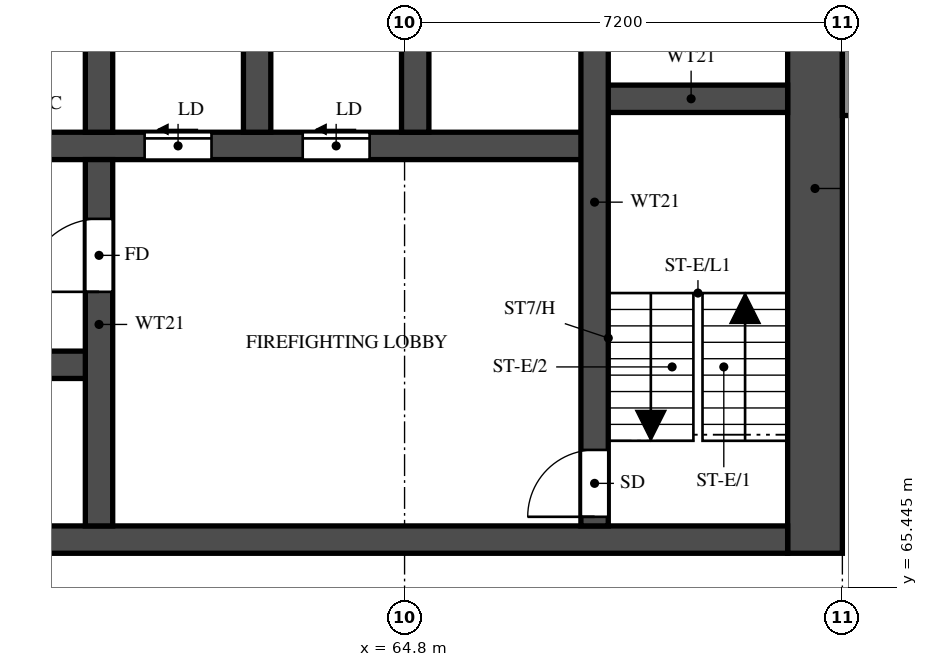
"""IFC4 building model, lengths in metres.
Left out: names, types, materials, properties, quantities, classifications, styles, units other than length and angle.
Written with IfcOpenShell. Run it as: python <this file> out.ifc"""

import sys

from ifc_helpers import new_model, si_unit, direction, frame, frame_2d, origin, place, context, subcontext, project, spatial, rectangle, extrude, element, fill, save


model = new_model("IFC4")
c1 = context("Model", 3, precision=1e-05, world=origin(), true_north=direction((0.0, 1.0)))
c2 = subcontext(c1, "Body", "Model", "MODEL_VIEW")
j1 = project(units=[si_unit("LENGTHUNIT", "METRE"), si_unit("PLANEANGLEUNIT", "RADIAN")], contexts=[c1])
p1 = place(None, origin())
s1 = spatial("IfcSite", under=j1, at=p1, CompositionType="ELEMENT")
p2 = place(p1, origin())
s2 = spatial("IfcBuilding", under=s1, at=p2, CompositionType="ELEMENT")
p3 = place(p2, frame((0.0, 0.0, 44.5)))
s3 = spatial("IfcBuildingStorey", under=s2, at=p3, CompositionType="ELEMENT", Elevation=44.5)
p4 = place(p3, frame((71.55, 66.0, 0.0), z_axis=(0.0, 0.0, 1.0), x_axis=(0.0, 1.0, 0.0)))
e1 = element("IfcWall", 1, at=p4, inside=s3, PredefinedType="SHEAR", context=c2, shape_type="SweptSolid", body=[
    extrude(rectangle(XDim=12.0, YDim=0.9, at=frame_2d((6.0, 0.0))), origin(), (0.0, 0.0, 1.0), 3.18),
])
p5 = place(p3, frame((29.7, 66.225, 0.0), z_axis=(0.0, 0.0, 1.0), x_axis=(1.0, 0.0, 0.0)))
e2 = element("IfcWall", 2, at=p5, inside=s3, PredefinedType="SHEAR", context=c2, shape_type="SweptSolid", body=[
    extrude(rectangle(XDim=41.4, YDim=0.45, at=frame_2d((20.7, 0.0))), origin(), (0.0, 0.0, 1.0), 3.18),
])
p6 = place(p5, frame((0.925, 0.0, 0.0)))
e3 = element("IfcOpeningElement", 3, at=p6, cuts=e2, PredefinedType="OPENING", context=c2, shape_type="SweptSolid", body=[
    extrude(rectangle(XDim=1.1, YDim=2.1, at=frame_2d((0.55, 1.05))), frame((0.0, 0.235, 0.0), z_axis=(0.0, -1.0, 0.0), x_axis=(1.0, 0.0, 0.0)), (0.0, 0.0, 1.0), 0.47),
])
p7 = place(p5, frame((3.738, 0.0, 0.0)))
e4 = element("IfcOpeningElement", 4, at=p7, cuts=e2, PredefinedType="OPENING", context=c2, shape_type="SweptSolid", body=[
    extrude(rectangle(XDim=1.8, YDim=2.1, at=frame_2d((0.9, 1.05))), frame((0.0, 0.235, 0.0), z_axis=(0.0, -1.0, 0.0), x_axis=(1.0, 0.0, 0.0)), (0.0, 0.0, 1.0), 0.47),
])
p8 = place(p3, frame((35.575, 69.1, 0.0), z_axis=(0.0, 0.0, 1.0), x_axis=(1.0, 0.0, 0.0)))
e5 = element("IfcWall", 5, at=p8, inside=s3, PredefinedType="SHEAR", context=c2, shape_type="SweptSolid", body=[
    extrude(rectangle(XDim=24.2, YDim=0.45, at=frame_2d((12.1, 0.0))), origin(), (0.0, 0.0, 1.0), 3.18),
])
p9 = place(p8, frame((1.05, 0.0, 0.0)))
e6 = element("IfcOpeningElement", 6, at=p9, cuts=e5, PredefinedType="OPENING", context=c2, shape_type="SweptSolid", body=[
    extrude(rectangle(XDim=1.1, YDim=2.1, at=frame_2d((0.55, 1.05))), frame((0.0, 0.235, 0.0), z_axis=(0.0, -1.0, 0.0), x_axis=(1.0, 0.0, 0.0)), (0.0, 0.0, 1.0), 0.47),
])
p10 = place(p8, frame((3.8, 0.0, 0.0)))
e7 = element("IfcOpeningElement", 7, at=p10, cuts=e5, PredefinedType="OPENING", context=c2, shape_type="SweptSolid", body=[
    extrude(rectangle(XDim=1.1, YDim=2.1, at=frame_2d((0.55, 1.05))), frame((0.0, 0.235, 0.0), z_axis=(0.0, -1.0, 0.0), x_axis=(1.0, 0.0, 0.0)), (0.0, 0.0, 1.0), 0.47),
])
p11 = place(p8, frame((6.55, 0.0, 0.0)))
e8 = element("IfcOpeningElement", 8, at=p11, cuts=e5, PredefinedType="OPENING", context=c2, shape_type="SweptSolid", body=[
    extrude(rectangle(XDim=1.1, YDim=2.1, at=frame_2d((0.55, 1.05))), frame((0.0, 0.235, 0.0), z_axis=(0.0, -1.0, 0.0), x_axis=(1.0, 0.0, 0.0)), (0.0, 0.0, 1.0), 0.47),
])
p12 = place(p8, frame((9.3, 0.0, 0.0)))
e9 = element("IfcOpeningElement", 9, at=p12, cuts=e5, PredefinedType="OPENING", context=c2, shape_type="SweptSolid", body=[
    extrude(rectangle(XDim=1.1, YDim=2.1, at=frame_2d((0.55, 1.05))), frame((0.0, 0.235, 0.0), z_axis=(0.0, -1.0, 0.0), x_axis=(1.0, 0.0, 0.0)), (0.0, 0.0, 1.0), 0.47),
])
p13 = place(p8, frame((12.05, 0.0, 0.0)))
e10 = element("IfcOpeningElement", 10, at=p13, cuts=e5, PredefinedType="OPENING", context=c2, shape_type="SweptSolid", body=[
    extrude(rectangle(XDim=1.1, YDim=2.1, at=frame_2d((0.55, 1.05))), frame((0.0, 0.235, 0.0), z_axis=(0.0, -1.0, 0.0), x_axis=(1.0, 0.0, 0.0)), (0.0, 0.0, 1.0), 0.47),
])
p14 = place(p8, frame((14.8, 0.0, 0.0)))
e11 = element("IfcOpeningElement", 11, at=p14, cuts=e5, PredefinedType="OPENING", context=c2, shape_type="SweptSolid", body=[
    extrude(rectangle(XDim=1.1, YDim=2.1, at=frame_2d((0.55, 1.05))), frame((0.0, 0.235, 0.0), z_axis=(0.0, -1.0, 0.0), x_axis=(1.0, 0.0, 0.0)), (0.0, 0.0, 1.0), 0.47),
])
p15 = place(p3, frame((32.875, 72.7, 0.0), z_axis=(0.0, 0.0, 1.0), x_axis=(1.0, 0.0, 0.0)))
e12 = element("IfcWall", 12, at=p15, inside=s3, PredefinedType="SHEAR", context=c2, shape_type="SweptSolid", body=[
    extrude(rectangle(XDim=35.05, YDim=0.45, at=frame_2d((17.525, 0.0))), origin(), (0.0, 0.0, 1.0), 3.18),
])
p16 = place(p15, frame((19.8, 0.0, 0.0)))
e13 = element("IfcOpeningElement", 13, at=p16, cuts=e12, PredefinedType="OPENING", context=c2, shape_type="SweptSolid", body=[
    extrude(rectangle(XDim=1.1, YDim=2.1, at=frame_2d((0.55, 1.05))), frame((0.0, 0.235, 0.0), z_axis=(0.0, -1.0, 0.0), x_axis=(1.0, 0.0, 0.0)), (0.0, 0.0, 1.0), 0.47),
])
p17 = place(p15, frame((27.65, 0.0, 0.0)))
e14 = element("IfcOpeningElement", 14, at=p17, cuts=e12, PredefinedType="OPENING", context=c2, shape_type="SweptSolid", body=[
    extrude(rectangle(XDim=1.1, YDim=2.1, at=frame_2d((0.55, 1.05))), frame((0.0, 0.235, 0.0), z_axis=(0.0, -1.0, 0.0), x_axis=(1.0, 0.0, 0.0)), (0.0, 0.0, 1.0), 0.47),
])
p18 = place(p15, frame((30.25, 0.0, 0.0)))
e15 = element("IfcOpeningElement", 15, at=p18, cuts=e12, PredefinedType="OPENING", context=c2, shape_type="SweptSolid", body=[
    extrude(rectangle(XDim=1.1, YDim=2.1, at=frame_2d((0.55, 1.05))), frame((0.0, 0.235, 0.0), z_axis=(0.0, -1.0, 0.0), x_axis=(1.0, 0.0, 0.0)), (0.0, 0.0, 1.0), 0.47),
])
p19 = place(p15, frame((3.75, 0.0, 0.0)))
e16 = element("IfcOpeningElement", 16, at=p19, cuts=e12, PredefinedType="OPENING", context=c2, shape_type="SweptSolid", body=[
    extrude(rectangle(XDim=1.1, YDim=2.1, at=frame_2d((0.55, 1.05))), frame((0.0, 0.235, 0.0), z_axis=(0.0, -1.0, 0.0), x_axis=(1.0, 0.0, 0.0)), (0.0, 0.0, 1.0), 0.47),
])
p20 = place(p15, frame((6.5, 0.0, 0.0)))
e17 = element("IfcOpeningElement", 17, at=p20, cuts=e12, PredefinedType="OPENING", context=c2, shape_type="SweptSolid", body=[
    extrude(rectangle(XDim=1.1, YDim=2.1, at=frame_2d((0.55, 1.05))), frame((0.0, 0.235, 0.0), z_axis=(0.0, -1.0, 0.0), x_axis=(1.0, 0.0, 0.0)), (0.0, 0.0, 1.0), 0.47),
])
p21 = place(p15, frame((9.25, 0.0, 0.0)))
e18 = element("IfcOpeningElement", 18, at=p21, cuts=e12, PredefinedType="OPENING", context=c2, shape_type="SweptSolid", body=[
    extrude(rectangle(XDim=1.1, YDim=2.1, at=frame_2d((0.55, 1.05))), frame((0.0, 0.235, 0.0), z_axis=(0.0, -1.0, 0.0), x_axis=(1.0, 0.0, 0.0)), (0.0, 0.0, 1.0), 0.47),
])
p22 = place(p15, frame((12.0, 0.0, 0.0)))
e19 = element("IfcOpeningElement", 19, at=p22, cuts=e12, PredefinedType="OPENING", context=c2, shape_type="SweptSolid", body=[
    extrude(rectangle(XDim=1.1, YDim=2.1, at=frame_2d((0.55, 1.05))), frame((0.0, 0.235, 0.0), z_axis=(0.0, -1.0, 0.0), x_axis=(1.0, 0.0, 0.0)), (0.0, 0.0, 1.0), 0.47),
])
p23 = place(p15, frame((14.75, 0.0, 0.0)))
e20 = element("IfcOpeningElement", 20, at=p23, cuts=e12, PredefinedType="OPENING", context=c2, shape_type="SweptSolid", body=[
    extrude(rectangle(XDim=1.1, YDim=2.1, at=frame_2d((0.55, 1.05))), frame((0.0, 0.235, 0.0), z_axis=(0.0, -1.0, 0.0), x_axis=(1.0, 0.0, 0.0)), (0.0, 0.0, 1.0), 0.47),
])
p24 = place(p15, frame((17.5, 0.0, 0.0)))
e21 = element("IfcOpeningElement", 21, at=p24, cuts=e12, PredefinedType="OPENING", context=c2, shape_type="SweptSolid", body=[
    extrude(rectangle(XDim=1.1, YDim=2.1, at=frame_2d((0.55, 1.05))), frame((0.0, 0.235, 0.0), z_axis=(0.0, -1.0, 0.0), x_axis=(1.0, 0.0, 0.0)), (0.0, 0.0, 1.0), 0.47),
])
p25 = place(p15, frame((0.913, 0.0, 0.0)))
e22 = element("IfcOpeningElement", 22, at=p25, cuts=e12, PredefinedType="OPENING", context=c2, shape_type="SweptSolid", body=[
    extrude(rectangle(XDim=1.1, YDim=2.1, at=frame_2d((0.55, 1.05))), frame((0.0, 0.235, 0.0), z_axis=(0.0, -1.0, 0.0), x_axis=(1.0, 0.0, 0.0)), (0.0, 0.0, 1.0), 0.47),
])
p26 = place(p3, frame((67.925, 73.475, 0.0), z_axis=(0.0, 0.0, 1.0), x_axis=(1.0, 0.0, 0.0)))
e23 = element("IfcWall", 23, at=p26, inside=s3, PredefinedType="SHEAR", context=c2, shape_type="SweptSolid", body=[
    extrude(rectangle(XDim=3.175, YDim=0.45, at=frame_2d((1.587, 0.0))), origin(), (0.0, 0.0, 1.0), 3.18),
])
p27 = place(p3, frame((67.925, 66.45, 0.0), z_axis=(0.0, 0.0, 1.0), x_axis=(0.0, 1.0, 0.0)))
e24 = element("IfcWall", 24, at=p27, inside=s3, PredefinedType="SHEAR", context=c2, shape_type="SweptSolid", body=[
    extrude(rectangle(XDim=10.65, YDim=0.45, at=frame_2d((5.325, 0.0))), origin(), (0.0, 0.0, 1.0), 3.18),
])
p28 = place(p27, frame((0.15, 0.0, 0.0)))
e25 = element("IfcOpeningElement", 25, at=p28, cuts=e24, PredefinedType="OPENING", context=c2, shape_type="SweptSolid", body=[
    extrude(rectangle(XDim=1.1, YDim=2.1, at=frame_2d((0.55, 1.05))), frame((0.0, 0.235, 0.0), z_axis=(0.0, -1.0, 0.0), x_axis=(1.0, 0.0, 0.0)), (0.0, 0.0, 1.0), 0.47),
])
p29 = place(p3, frame((59.775, 66.45, 0.0), z_axis=(0.0, 0.0, 1.0), x_axis=(0.0, 1.0, 0.0)))
e26 = element("IfcWall", 26, at=p29, inside=s3, PredefinedType="SHEAR", context=c2, shape_type="SweptSolid", body=[
    extrude(rectangle(XDim=6.025, YDim=0.45, at=frame_2d((3.013, 0.0))), origin(), (0.0, 0.0, 1.0), 3.18),
])
p30 = place(p29, frame((3.85, 0.0, 0.0)))
e27 = element("IfcOpeningElement", 27, at=p30, cuts=e26, PredefinedType="OPENING", context=c2, shape_type="SweptSolid", body=[
    extrude(rectangle(XDim=1.2, YDim=2.1, at=frame_2d((0.6, 1.05))), frame((0.0, 0.235, 0.0), z_axis=(0.0, -1.0, 0.0), x_axis=(1.0, 0.0, 0.0)), (0.0, 0.0, 1.0), 0.47),
])
for number, where, z_axis, x_axis in (
    (28, (59.775, 72.925, 0.0), (0.0, 0.0, 1.0), (0.0, 1.0, 0.0)),
    (29, (62.375, 72.925, 0.0), (0.0, 0.0, 1.0), (0.0, 1.0, 0.0)),
    (30, (64.975, 72.925, 0.0), (0.0, 0.0, 1.0), (0.0, 1.0, 0.0)),
):
    element("IfcWall", number, at=place(p3, frame(where, z_axis=z_axis, x_axis=x_axis)), inside=s3, PredefinedType="SHEAR", context=c2, shape_type="SweptSolid", body=[
        extrude(rectangle(XDim=2.95, YDim=0.45, at=frame_2d((1.475, 0.0))), origin(), (0.0, 0.0, 1.0), 3.18),
    ])
p31 = place(p3, frame((72.1, 73.2, 0.0), z_axis=(0.0, 0.0, 1.0), x_axis=(0.0, 1.0, 0.0)))
e31 = element("IfcWall", 31, at=p31, inside=s3, PredefinedType="SOLIDWALL", context=c2, shape_type="SweptSolid", body=[
    extrude(rectangle(XDim=4.8, YDim=0.2, at=frame_2d((2.4, 0.0))), origin(), (0.0, 0.0, 1.0), 3.18),
])
p32 = place(p28, origin())
e32 = element("IfcDoor", 32, at=p32, inside=s3, OperationType="SINGLE_SWING_LEFT", PredefinedType="DOOR", context=c2, shape_type="SweptSolid", body=[
    extrude(rectangle(XDim=1.1, YDim=2.1, at=frame_2d((0.55, 1.05))), frame((0.0, 0.025, 0.0), z_axis=(0.0, -1.0, 0.0), x_axis=(1.0, 0.0, 0.0)), (0.0, 0.0, 1.0), 0.05),
])
fill(e25, e32)
p33 = place(p30, origin())
e33 = element("IfcDoor", 33, at=p33, inside=s3, OperationType="SINGLE_SWING_RIGHT", PredefinedType="DOOR", context=c2, shape_type="SweptSolid", body=[
    extrude(rectangle(XDim=1.2, YDim=2.1, at=frame_2d((0.6, 1.05))), frame((0.0, 0.025, 0.0), z_axis=(0.0, -1.0, 0.0), x_axis=(1.0, 0.0, 0.0)), (0.0, 0.0, 1.0), 0.05),
])
fill(e27, e33)
p34 = place(p17, origin())
e34 = element("IfcDoor", 34, at=p34, inside=s3, OperationType="SLIDING_TO_LEFT", PredefinedType="DOOR", context=c2, shape_type="SweptSolid", body=[
    extrude(rectangle(XDim=1.1, YDim=2.1, at=frame_2d((0.55, 1.05))), frame((0.0, 0.025, 0.0), z_axis=(0.0, -1.0, 0.0), x_axis=(1.0, 0.0, 0.0)), (0.0, 0.0, 1.0), 0.05),
])
fill(e14, e34)
p35 = place(p18, origin())
e35 = element("IfcDoor", 35, at=p35, inside=s3, OperationType="SLIDING_TO_LEFT", PredefinedType="DOOR", context=c2, shape_type="SweptSolid", body=[
    extrude(rectangle(XDim=1.1, YDim=2.1, at=frame_2d((0.55, 1.05))), frame((0.0, 0.025, 0.0), z_axis=(0.0, -1.0, 0.0), x_axis=(1.0, 0.0, 0.0)), (0.0, 0.0, 1.0), 0.05),
])
fill(e15, e35)
save(model, sys.argv[1])
